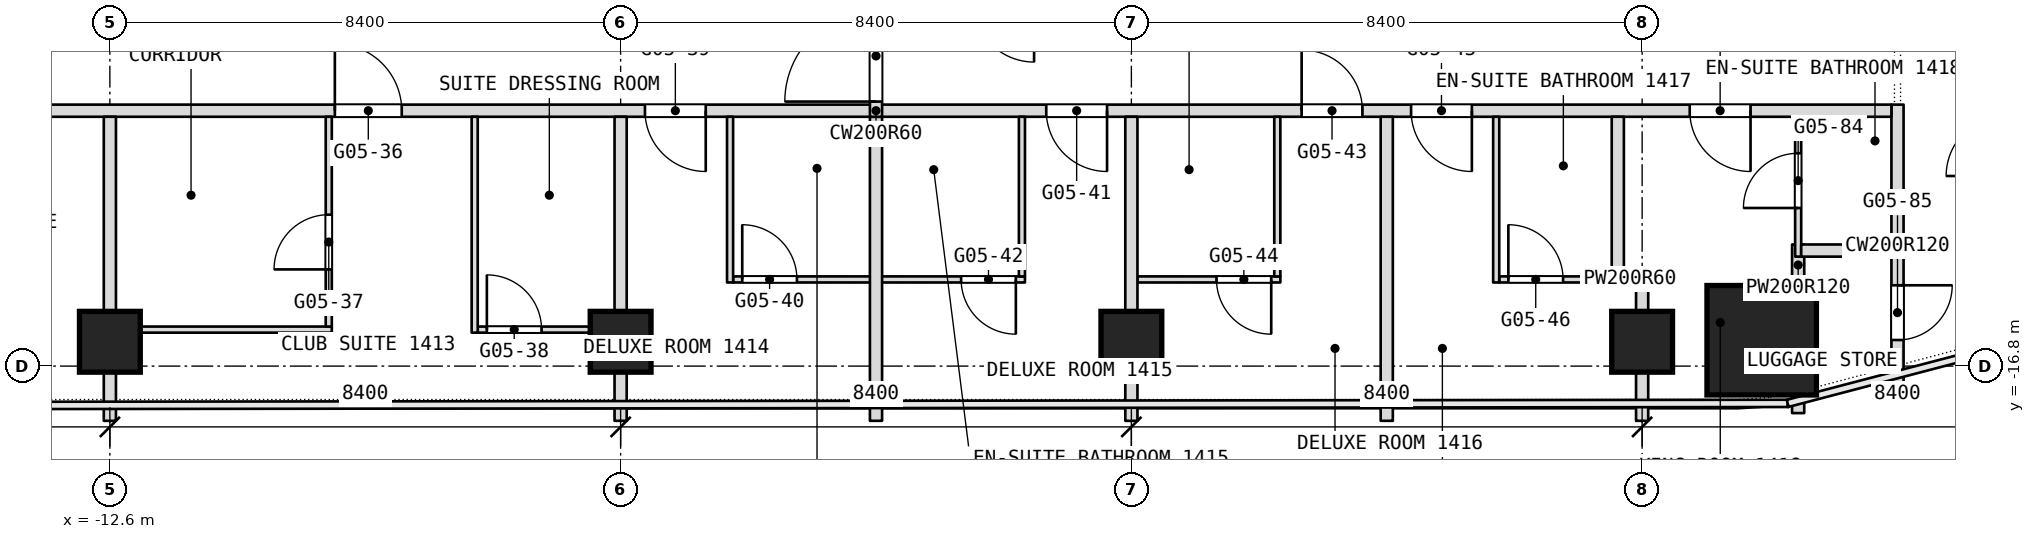
"""IFC4 building model, lengths in metres.
Left out: names, types, materials, properties, quantities, classifications, styles, units other than length and angle.
Written with IfcOpenShell. Run it as: python <this file> out.ifc"""

import sys

from ifc_helpers import new_model, si_unit, direction, frame, frame_2d, origin, origin_2d, place, context, subcontext, project, spatial, rectangle, extrude, element, fill, save


model = new_model("IFC4")
c1 = context("Model", 3, precision=1e-05, world=origin(), true_north=direction((0.0, 1.0)))
c2 = subcontext(c1, "Body", "Model", "MODEL_VIEW")
j1 = project(units=[si_unit("LENGTHUNIT", "METRE"), si_unit("PLANEANGLEUNIT", "RADIAN")], contexts=[c1])
p1 = place(None, origin())
s1 = spatial("IfcSite", under=j1, at=p1, CompositionType="ELEMENT")
p2 = place(p1, origin())
s2 = spatial("IfcBuilding", under=s1, at=p2, CompositionType="ELEMENT")
p3 = place(p2, frame((0.0, 0.0, 65.3)))
s3 = spatial("IfcBuildingStorey", under=s2, at=p3, CompositionType="ELEMENT", Elevation=65.3)
p4 = place(p3, frame((14.566, -16.375, 0.0), z_axis=(0.0, 0.0, 1.0), x_axis=(1.0, 0.0, 0.0)))
e1 = element("IfcColumn", 1, at=p4, inside=s3, PredefinedType="COLUMN", context=c2, shape_type="SweptSolid", body=[
    extrude(rectangle(XDim=1.8, YDim=1.8, at=origin_2d()), origin(), (0.0, 0.0, 1.0), 3.6),
])
for number, where, z_axis, x_axis in (
    (2, (12.6, -16.4, 0.0), (0.0, 0.0, 1.0), (1.0, 0.0, 0.0)),
    (3, (4.2, -16.4, 0.0), (0.0, 0.0, 1.0), (1.0, 0.0, 0.0)),
    (4, (-4.2, -16.4, 0.0), (0.0, 0.0, 1.0), (1.0, 0.0, 0.0)),
    (5, (-12.6, -16.4, 0.0), (0.0, 0.0, 1.0), (1.0, 0.0, 0.0)),
):
    element("IfcColumn", number, at=place(p3, frame(where, z_axis=z_axis, x_axis=x_axis)), inside=s3, PredefinedType="COLUMN", context=c2, shape_type="SweptSolid", body=[
        extrude(rectangle(XDim=1.0, YDim=1.0, at=origin_2d()), origin(), (0.0, 0.0, 1.0), 3.6),
    ])
p5 = place(p3, frame((16.8, -17.143, 0.0), z_axis=(0.0, 0.0, 1.0), x_axis=(0.0, 1.0, 0.0)))
e6 = element("IfcWall", 6, at=p5, inside=s3, PredefinedType="PARTITIONING", context=c2, shape_type="SweptSolid", body=[
    extrude(rectangle(XDim=4.643, YDim=0.2, at=frame_2d((2.322, 0.0))), origin(), (0.0, 0.0, 1.0), 3.34),
])
p6 = place(p5, frame((0.772, 0.0, 0.0)))
e7 = element("IfcOpeningElement", 7, at=p6, cuts=e6, PredefinedType="OPENING", context=c2, shape_type="SweptSolid", body=[
    extrude(rectangle(XDim=0.9, YDim=2.1, at=frame_2d((0.45, 1.05))), frame((0.0, 0.1, 0.0), z_axis=(0.0, -1.0, 0.0), x_axis=(1.0, 0.0, 0.0)), (0.0, 0.0, 1.0), 0.2),
])
p7 = place(p3, frame((-12.5, -16.2, 0.0), z_axis=(0.0, 0.0, 1.0), x_axis=(1.0, 0.0, 0.0)))
e8 = element("IfcWall", 8, at=p7, inside=s3, PredefinedType="PARTITIONING", context=c2, shape_type="SweptSolid", body=[
    extrude(rectangle(XDim=3.55, YDim=0.1, at=frame_2d((1.775, 0.0))), origin(), (0.0, 0.0, 1.0), 2.94),
])
p8 = place(p3, frame((-6.55, -16.2, 0.0), z_axis=(0.0, 0.0, 1.0), x_axis=(1.0, 0.0, 0.0)))
e9 = element("IfcWall", 9, at=p8, inside=s3, PredefinedType="PARTITIONING", context=c2, shape_type="SweptSolid", body=[
    extrude(rectangle(XDim=2.45, YDim=0.1, at=frame_2d((1.225, 0.0))), origin(), (0.0, 0.0, 1.0), 2.94),
])
p9 = place(p8, frame((0.15, 0.0, 0.0)))
e10 = element("IfcOpeningElement", 10, at=p9, cuts=e9, PredefinedType="OPENING", context=c2, shape_type="SweptSolid", body=[
    extrude(rectangle(XDim=0.9, YDim=2.1, at=frame_2d((0.45, 1.05))), frame((0.0, 0.05, 0.0), z_axis=(0.0, -1.0, 0.0), x_axis=(1.0, 0.0, 0.0)), (0.0, 0.0, 1.0), 0.1),
])
p10 = place(p3, frame((-2.35, -15.375, 0.0), z_axis=(0.0, 0.0, 1.0), x_axis=(1.0, 0.0, 0.0)))
e11 = element("IfcWall", 11, at=p10, inside=s3, PredefinedType="PARTITIONING", context=c2, shape_type="SweptSolid", body=[
    extrude(rectangle(XDim=4.8, YDim=0.1, at=frame_2d((2.4, 0.0))), origin(), (0.0, 0.0, 1.0), 3.34),
])
p11 = place(p10, frame((0.15, 0.0, 0.0)))
e12 = element("IfcOpeningElement", 12, at=p11, cuts=e11, PredefinedType="OPENING", context=c2, shape_type="SweptSolid", body=[
    extrude(rectangle(XDim=0.9, YDim=2.1, at=frame_2d((0.45, 1.05))), frame((0.0, 0.05, 0.0), z_axis=(0.0, -1.0, 0.0), x_axis=(1.0, 0.0, 0.0)), (0.0, 0.0, 1.0), 0.1),
])
p12 = place(p10, frame((3.75, 0.0, 0.0)))
e13 = element("IfcOpeningElement", 13, at=p12, cuts=e11, PredefinedType="OPENING", context=c2, shape_type="SweptSolid", body=[
    extrude(rectangle(XDim=0.9, YDim=2.1, at=frame_2d((0.45, 1.05))), frame((0.0, 0.05, 0.0), z_axis=(0.0, -1.0, 0.0), x_axis=(1.0, 0.0, 0.0)), (0.0, 0.0, 1.0), 0.1),
])
p13 = place(p3, frame((4.3, -15.375, 0.0), z_axis=(0.0, 0.0, 1.0), x_axis=(1.0, 0.0, 0.0)))
e14 = element("IfcWall", 14, at=p13, inside=s3, PredefinedType="PARTITIONING", context=c2, shape_type="SweptSolid", body=[
    extrude(rectangle(XDim=2.35, YDim=0.1, at=frame_2d((1.175, 0.0))), origin(), (0.0, 0.0, 1.0), 3.34),
])
p14 = place(p13, frame((1.3, 0.0, 0.0)))
e15 = element("IfcOpeningElement", 15, at=p14, cuts=e14, PredefinedType="OPENING", context=c2, shape_type="SweptSolid", body=[
    extrude(rectangle(XDim=0.9, YDim=2.1, at=frame_2d((0.45, 1.05))), frame((0.0, 0.05, 0.0), z_axis=(0.0, -1.0, 0.0), x_axis=(1.0, 0.0, 0.0)), (0.0, 0.0, 1.0), 0.1),
])
p15 = place(p3, frame((10.25, -15.375, 0.0), z_axis=(0.0, 0.0, 1.0), x_axis=(1.0, 0.0, 0.0)))
e16 = element("IfcWall", 16, at=p15, inside=s3, PredefinedType="PARTITIONING", context=c2, shape_type="SweptSolid", body=[
    extrude(rectangle(XDim=2.05, YDim=0.1, at=frame_2d((1.025, 0.0))), origin(), (0.0, 0.0, 1.0), 3.34),
])
p16 = place(p15, frame((0.15, 0.0, 0.0)))
e17 = element("IfcOpeningElement", 17, at=p16, cuts=e16, PredefinedType="OPENING", context=c2, shape_type="SweptSolid", body=[
    extrude(rectangle(XDim=0.9, YDim=2.1, at=frame_2d((0.45, 1.05))), frame((0.0, 0.05, 0.0), z_axis=(0.0, -1.0, 0.0), x_axis=(1.0, 0.0, 0.0)), (0.0, 0.0, 1.0), 0.1),
])
p17 = place(p3, frame((12.1, -15.375, 0.0), z_axis=(0.0, 0.0, 1.0), x_axis=(1.0, 0.0, 0.0)))
e18 = element("IfcWall", 18, at=p17, inside=s3, PredefinedType="PARTITIONING", context=c2, shape_type="SweptSolid", body=[
    extrude(rectangle(XDim=0.6, YDim=0.2, at=frame_2d((0.3, 0.0))), origin(), (0.0, 0.0, 1.0), 3.34),
])
p18 = place(p3, frame((15.166, -17.573, 0.0), z_axis=(0.0, 0.0, 1.0), x_axis=(0.0, 1.0, 0.0)))
e19 = element("IfcWall", 19, at=p18, inside=s3, PredefinedType="PARTITIONING", context=c2, shape_type="SweptSolid", body=[
    extrude(rectangle(XDim=0.298, YDim=0.2, at=frame_2d((0.149, 0.0))), origin(), (0.0, 0.0, 1.0), 3.34),
])
p19 = place(p3, frame((15.166, -15.475, 0.0), z_axis=(0.0, 0.0, 1.0), x_axis=(0.0, 1.0, 0.0)))
e20 = element("IfcWall", 20, at=p19, inside=s3, PredefinedType="PARTITIONING", context=c2, shape_type="SweptSolid", body=[
    extrude(rectangle(XDim=0.675, YDim=0.2, at=frame_2d((0.337, 0.0))), origin(), (0.0, 0.0, 1.0), 3.34),
])
p20 = place(p3, frame((15.166, -15.0, 0.0), z_axis=(0.0, 0.0, 1.0), x_axis=(0.0, 1.0, 0.0)))
e21 = element("IfcWall", 21, at=p20, inside=s3, PredefinedType="PARTITIONING", context=c2, shape_type="SweptSolid", body=[
    extrude(rectangle(XDim=2.3, YDim=0.1, at=frame_2d((1.15, 0.0))), origin(), (0.0, 0.0, 1.0), 3.34),
])
p21 = place(p20, frame((0.8, 0.0, 0.0)))
e22 = element("IfcOpeningElement", 22, at=p21, cuts=e21, PredefinedType="OPENING", context=c2, shape_type="SweptSolid", body=[
    extrude(rectangle(XDim=0.9, YDim=2.1, at=frame_2d((0.45, 1.05))), frame((0.0, 0.05, 0.0), z_axis=(0.0, -1.0, 0.0), x_axis=(1.0, 0.0, 0.0)), (0.0, 0.0, 1.0), 0.1),
])
p22 = place(p3, frame((15.216, -14.9, 0.0), z_axis=(0.0, 0.0, 1.0), x_axis=(1.0, 0.0, 0.0)))
e23 = element("IfcWall", 23, at=p22, inside=s3, PredefinedType="PARTITIONING", context=c2, shape_type="SweptSolid", body=[
    extrude(rectangle(XDim=1.484, YDim=0.2, at=frame_2d((0.742, 0.0))), origin(), (0.0, 0.0, 1.0), 3.34),
])
p23 = place(p3, frame((12.6, -17.7, 0.0), z_axis=(0.0, 0.0, 1.0), x_axis=(0.0, 1.0, 0.0)))
e24 = element("IfcWall", 24, at=p23, inside=s3, PredefinedType="PARTITIONING", context=c2, shape_type="SweptSolid", body=[
    extrude(rectangle(XDim=2.225, YDim=0.2, at=frame_2d((1.112, 0.0))), origin(), (0.0, 0.0, 1.0), 3.34),
])
p24 = place(p3, frame((-16.7, -12.6, 0.0), z_axis=(0.0, 0.0, 1.0), x_axis=(1.0, 0.0, 0.0)))
e25 = element("IfcWall", 25, at=p24, inside=s3, PredefinedType="PARTITIONING", context=c2, shape_type="SweptSolid", body=[
    extrude(rectangle(XDim=33.4, YDim=0.2, at=frame_2d((16.7, 0.0))), origin(), (0.0, 0.0, 1.0), 3.34),
])
p25 = place(p24, frame((1.5, 0.0, 0.0)))
e26 = element("IfcOpeningElement", 26, at=p25, cuts=e25, PredefinedType="OPENING", context=c2, shape_type="SweptSolid", body=[
    extrude(rectangle(XDim=1.0, YDim=2.1, at=frame_2d((0.5, 1.05))), frame((0.0, 0.1, 0.0), z_axis=(0.0, -1.0, 0.0), x_axis=(1.0, 0.0, 0.0)), (0.0, 0.0, 1.0), 0.2),
])
p26 = place(p24, frame((7.8, 0.0, 0.0)))
e27 = element("IfcOpeningElement", 27, at=p26, cuts=e25, PredefinedType="OPENING", context=c2, shape_type="SweptSolid", body=[
    extrude(rectangle(XDim=1.1, YDim=2.1, at=frame_2d((0.55, 1.05))), frame((0.0, 0.1, 0.0), z_axis=(0.0, -1.0, 0.0), x_axis=(1.0, 0.0, 0.0)), (0.0, 0.0, 1.0), 0.2),
])
p27 = place(p24, frame((12.9, 0.0, 0.0)))
e28 = element("IfcOpeningElement", 28, at=p27, cuts=e25, PredefinedType="OPENING", context=c2, shape_type="SweptSolid", body=[
    extrude(rectangle(XDim=1.0, YDim=2.1, at=frame_2d((0.5, 1.05))), frame((0.0, 0.1, 0.0), z_axis=(0.0, -1.0, 0.0), x_axis=(1.0, 0.0, 0.0)), (0.0, 0.0, 1.0), 0.2),
])
p28 = place(p24, frame((19.5, 0.0, 0.0)))
e29 = element("IfcOpeningElement", 29, at=p28, cuts=e25, PredefinedType="OPENING", context=c2, shape_type="SweptSolid", body=[
    extrude(rectangle(XDim=1.0, YDim=2.1, at=frame_2d((0.5, 1.05))), frame((0.0, 0.1, 0.0), z_axis=(0.0, -1.0, 0.0), x_axis=(1.0, 0.0, 0.0)), (0.0, 0.0, 1.0), 0.2),
])
p29 = place(p24, frame((23.7, 0.0, 0.0)))
e30 = element("IfcOpeningElement", 30, at=p29, cuts=e25, PredefinedType="OPENING", context=c2, shape_type="SweptSolid", body=[
    extrude(rectangle(XDim=1.0, YDim=2.1, at=frame_2d((0.5, 1.05))), frame((0.0, 0.1, 0.0), z_axis=(0.0, -1.0, 0.0), x_axis=(1.0, 0.0, 0.0)), (0.0, 0.0, 1.0), 0.2),
])
p30 = place(p24, frame((25.5, 0.0, 0.0)))
e31 = element("IfcOpeningElement", 31, at=p30, cuts=e25, PredefinedType="OPENING", context=c2, shape_type="SweptSolid", body=[
    extrude(rectangle(XDim=1.0, YDim=2.1, at=frame_2d((0.5, 1.05))), frame((0.0, 0.1, 0.0), z_axis=(0.0, -1.0, 0.0), x_axis=(1.0, 0.0, 0.0)), (0.0, 0.0, 1.0), 0.2),
])
p31 = place(p24, frame((30.083, 0.0, 0.0)))
e32 = element("IfcOpeningElement", 32, at=p31, cuts=e25, PredefinedType="OPENING", context=c2, shape_type="SweptSolid", body=[
    extrude(rectangle(XDim=1.0, YDim=2.1, at=frame_2d((0.5, 1.05))), frame((0.0, 0.1, 0.0), z_axis=(0.0, -1.0, 0.0), x_axis=(1.0, 0.0, 0.0)), (0.0, 0.0, 1.0), 0.2),
])
p32 = place(p3, frame((12.2, -15.325, 0.0), z_axis=(0.0, 0.0, 1.0), x_axis=(0.0, 1.0, 0.0)))
e33 = element("IfcWall", 33, at=p32, inside=s3, PredefinedType="PARTITIONING", context=c2, shape_type="SweptSolid", body=[
    extrude(rectangle(XDim=2.625, YDim=0.2, at=frame_2d((1.312, 0.0))), origin(), (0.0, 0.0, 1.0), 3.34),
])
p33 = place(p3, frame((10.2, -15.425, 0.0), z_axis=(0.0, 0.0, 1.0), x_axis=(0.0, 1.0, 0.0)))
e34 = element("IfcWall", 34, at=p33, inside=s3, PredefinedType="PARTITIONING", context=c2, shape_type="SweptSolid", body=[
    extrude(rectangle(XDim=2.725, YDim=0.1, at=frame_2d((1.363, 0.0))), origin(), (0.0, 0.0, 1.0), 3.34),
])
p34 = place(p3, frame((8.4, -17.7, 0.0), z_axis=(0.0, 0.0, 1.0), x_axis=(0.0, 1.0, 0.0)))
e35 = element("IfcWall", 35, at=p34, inside=s3, PredefinedType="PARTITIONING", context=c2, shape_type="SweptSolid", body=[
    extrude(rectangle(XDim=5.0, YDim=0.2, at=frame_2d((2.5, 0.0))), origin(), (0.0, 0.0, 1.0), 3.34),
])
p35 = place(p3, frame((6.6, -15.325, 0.0), z_axis=(0.0, 0.0, 1.0), x_axis=(0.0, 1.0, 0.0)))
e36 = element("IfcWall", 36, at=p35, inside=s3, PredefinedType="PARTITIONING", context=c2, shape_type="SweptSolid", body=[
    extrude(rectangle(XDim=2.625, YDim=0.1, at=frame_2d((1.312, 0.0))), origin(), (0.0, 0.0, 1.0), 3.34),
])
p36 = place(p3, frame((4.2, -17.7, 0.0), z_axis=(0.0, 0.0, 1.0), x_axis=(0.0, 1.0, 0.0)))
e37 = element("IfcWall", 37, at=p36, inside=s3, PredefinedType="PARTITIONING", context=c2, shape_type="SweptSolid", body=[
    extrude(rectangle(XDim=5.0, YDim=0.2, at=frame_2d((2.5, 0.0))), origin(), (0.0, 0.0, 1.0), 3.34),
])
p37 = place(p3, frame((2.4, -15.325, 0.0), z_axis=(0.0, 0.0, 1.0), x_axis=(0.0, 1.0, 0.0)))
e38 = element("IfcWall", 38, at=p37, inside=s3, PredefinedType="PARTITIONING", context=c2, shape_type="SweptSolid", body=[
    extrude(rectangle(XDim=2.625, YDim=0.1, at=frame_2d((1.312, 0.0))), origin(), (0.0, 0.0, 1.0), 3.34),
])
p38 = place(p3, frame((0.0, -17.7, 0.0), z_axis=(0.0, 0.0, 1.0), x_axis=(0.0, 1.0, 0.0)))
e39 = element("IfcWall", 39, at=p38, inside=s3, PredefinedType="PARTITIONING", context=c2, shape_type="SweptSolid", body=[
    extrude(rectangle(XDim=5.0, YDim=0.2, at=frame_2d((2.5, 0.0))), origin(), (0.0, 0.0, 1.0), 3.34),
])
p39 = place(p3, frame((0.0, -12.7, 0.0), z_axis=(0.0, 0.0, 1.0), x_axis=(0.0, 1.0, 0.0)))
e40 = element("IfcWall", 40, at=p39, inside=s3, PredefinedType="PARTITIONING", context=c2, shape_type="SweptSolid", body=[
    extrude(rectangle(XDim=12.7, YDim=0.2, at=frame_2d((6.35, 0.0))), origin(), (0.0, 0.0, 1.0), 3.34),
])
p40 = place(p39, frame((11.05, 0.0, 0.0)))
e41 = element("IfcOpeningElement", 41, at=p40, cuts=e40, PredefinedType="OPENING", context=c2, shape_type="SweptSolid", body=[
    extrude(rectangle(XDim=1.5, YDim=2.1, at=frame_2d((0.75, 1.05))), frame((0.0, 0.1, 0.0), z_axis=(0.0, -1.0, 0.0), x_axis=(1.0, 0.0, 0.0)), (0.0, 0.0, 1.0), 0.2),
])
p41 = place(p39, frame((0.25, 0.0, 0.0)))
e42 = element("IfcOpeningElement", 42, at=p41, cuts=e40, PredefinedType="OPENING", context=c2, shape_type="SweptSolid", body=[
    extrude(rectangle(XDim=1.5, YDim=2.1, at=frame_2d((0.75, 1.05))), frame((0.0, 0.1, 0.0), z_axis=(0.0, -1.0, 0.0), x_axis=(1.0, 0.0, 0.0)), (0.0, 0.0, 1.0), 0.2),
])
p42 = place(p3, frame((-2.4, -15.425, 0.0), z_axis=(0.0, 0.0, 1.0), x_axis=(0.0, 1.0, 0.0)))
e43 = element("IfcWall", 43, at=p42, inside=s3, PredefinedType="PARTITIONING", context=c2, shape_type="SweptSolid", body=[
    extrude(rectangle(XDim=2.725, YDim=0.1, at=frame_2d((1.363, 0.0))), origin(), (0.0, 0.0, 1.0), 3.34),
])
p43 = place(p3, frame((-4.2, -17.7, 0.0), z_axis=(0.0, 0.0, 1.0), x_axis=(0.0, 1.0, 0.0)))
e44 = element("IfcWall", 44, at=p43, inside=s3, PredefinedType="PARTITIONING", context=c2, shape_type="SweptSolid", body=[
    extrude(rectangle(XDim=5.0, YDim=0.2, at=frame_2d((2.5, 0.0))), origin(), (0.0, 0.0, 1.0), 3.34),
])
p44 = place(p3, frame((-6.6, -16.25, 0.0), z_axis=(0.0, 0.0, 1.0), x_axis=(0.0, 1.0, 0.0)))
e45 = element("IfcWall", 45, at=p44, inside=s3, PredefinedType="PARTITIONING", context=c2, shape_type="SweptSolid", body=[
    extrude(rectangle(XDim=3.55, YDim=0.1, at=frame_2d((1.775, 0.0))), origin(), (0.0, 0.0, 1.0), 3.34),
])
p45 = place(p3, frame((-9.0, -16.15, 0.0), z_axis=(0.0, 0.0, 1.0), x_axis=(0.0, 1.0, 0.0)))
e46 = element("IfcWall", 46, at=p45, inside=s3, PredefinedType="PARTITIONING", context=c2, shape_type="SweptSolid", body=[
    extrude(rectangle(XDim=3.45, YDim=0.1, at=frame_2d((1.725, 0.0))), origin(), (0.0, 0.0, 1.0), 3.34),
])
p46 = place(p45, frame((0.94, 0.0, 0.0)))
e47 = element("IfcOpeningElement", 47, at=p46, cuts=e46, PredefinedType="OPENING", context=c2, shape_type="SweptSolid", body=[
    extrude(rectangle(XDim=0.9, YDim=2.1, at=frame_2d((0.45, 1.05))), frame((0.0, 0.05, 0.0), z_axis=(0.0, -1.0, 0.0), x_axis=(1.0, 0.0, 0.0)), (0.0, 0.0, 1.0), 0.1),
])
p47 = place(p3, frame((-12.6, -17.7, 0.0), z_axis=(0.0, 0.0, 1.0), x_axis=(0.0, 1.0, 0.0)))
e48 = element("IfcWall", 48, at=p47, inside=s3, PredefinedType="PARTITIONING", context=c2, shape_type="SweptSolid", body=[
    extrude(rectangle(XDim=5.0, YDim=0.2, at=frame_2d((2.5, 0.0))), origin(), (0.0, 0.0, 1.0), 3.34),
])
p48 = place(p6, origin())
e49 = element("IfcDoor", 49, at=p48, inside=s3, OperationType="SINGLE_SWING_RIGHT", PredefinedType="DOOR", context=c2, shape_type="SweptSolid", body=[
    extrude(rectangle(XDim=0.9, YDim=2.1, at=frame_2d((0.45, 1.05))), frame((0.0, 0.025, 0.0), z_axis=(0.0, -1.0, 0.0), x_axis=(1.0, 0.0, 0.0)), (0.0, 0.0, 1.0), 0.05),
])
fill(e7, e49)
p49 = place(p9, origin())
e50 = element("IfcDoor", 50, at=p49, inside=s3, OperationType="SINGLE_SWING_LEFT", PredefinedType="DOOR", context=c2, shape_type="SweptSolid", body=[
    extrude(rectangle(XDim=0.9, YDim=2.1, at=frame_2d((0.45, 1.05))), frame((0.0, 0.025, 0.0), z_axis=(0.0, -1.0, 0.0), x_axis=(1.0, 0.0, 0.0)), (0.0, 0.0, 1.0), 0.05),
])
fill(e10, e50)
p50 = place(p11, origin())
e51 = element("IfcDoor", 51, at=p50, inside=s3, OperationType="SINGLE_SWING_LEFT", PredefinedType="DOOR", context=c2, shape_type="SweptSolid", body=[
    extrude(rectangle(XDim=0.9, YDim=2.1, at=frame_2d((0.45, 1.05))), frame((0.0, 0.025, 0.0), z_axis=(0.0, -1.0, 0.0), x_axis=(1.0, 0.0, 0.0)), (0.0, 0.0, 1.0), 0.05),
])
fill(e12, e51)
p51 = place(p12, origin())
e52 = element("IfcDoor", 52, at=p51, inside=s3, OperationType="SINGLE_SWING_RIGHT", PredefinedType="DOOR", context=c2, shape_type="SweptSolid", body=[
    extrude(rectangle(XDim=0.9, YDim=2.1, at=frame_2d((0.45, 1.05))), frame((0.0, 0.025, 0.0), z_axis=(0.0, -1.0, 0.0), x_axis=(1.0, 0.0, 0.0)), (0.0, 0.0, 1.0), 0.05),
])
fill(e13, e52)
p52 = place(p14, origin())
e53 = element("IfcDoor", 53, at=p52, inside=s3, OperationType="SINGLE_SWING_RIGHT", PredefinedType="DOOR", context=c2, shape_type="SweptSolid", body=[
    extrude(rectangle(XDim=0.9, YDim=2.1, at=frame_2d((0.45, 1.05))), frame((0.0, 0.025, 0.0), z_axis=(0.0, -1.0, 0.0), x_axis=(1.0, 0.0, 0.0)), (0.0, 0.0, 1.0), 0.05),
])
fill(e15, e53)
p53 = place(p16, origin())
e54 = element("IfcDoor", 54, at=p53, inside=s3, OperationType="SINGLE_SWING_LEFT", PredefinedType="DOOR", context=c2, shape_type="SweptSolid", body=[
    extrude(rectangle(XDim=0.9, YDim=2.1, at=frame_2d((0.45, 1.05))), frame((0.0, 0.025, 0.0), z_axis=(0.0, -1.0, 0.0), x_axis=(1.0, 0.0, 0.0)), (0.0, 0.0, 1.0), 0.05),
])
fill(e17, e54)
p54 = place(p21, origin())
e55 = element("IfcDoor", 55, at=p54, inside=s3, OperationType="SINGLE_SWING_RIGHT", PredefinedType="DOOR", context=c2, shape_type="SweptSolid", body=[
    extrude(rectangle(XDim=0.9, YDim=2.1, at=frame_2d((0.45, 1.05))), frame((0.0, 0.025, 0.0), z_axis=(0.0, -1.0, 0.0), x_axis=(1.0, 0.0, 0.0)), (0.0, 0.0, 1.0), 0.05),
])
fill(e22, e55)
p55 = place(p26, origin())
e56 = element("IfcDoor", 56, at=p55, inside=s3, OperationType="SINGLE_SWING_RIGHT", PredefinedType="DOOR", context=c2, shape_type="SweptSolid", body=[
    extrude(rectangle(XDim=1.1, YDim=2.1, at=frame_2d((0.55, 1.05))), frame((0.0, 0.025, 0.0), z_axis=(0.0, -1.0, 0.0), x_axis=(1.0, 0.0, 0.0)), (0.0, 0.0, 1.0), 0.05),
])
fill(e27, e56)
p56 = place(p27, origin())
e57 = element("IfcDoor", 57, at=p56, inside=s3, OperationType="SINGLE_SWING_LEFT", PredefinedType="DOOR", context=c2, shape_type="SweptSolid", body=[
    extrude(rectangle(XDim=1.0, YDim=2.1, at=frame_2d((0.5, 1.05))), frame((0.0, 0.025, 0.0), z_axis=(0.0, -1.0, 0.0), x_axis=(1.0, 0.0, 0.0)), (0.0, 0.0, 1.0), 0.05),
])
fill(e28, e57)
p57 = place(p28, origin())
e58 = element("IfcDoor", 58, at=p57, inside=s3, OperationType="SINGLE_SWING_LEFT", PredefinedType="DOOR", context=c2, shape_type="SweptSolid", body=[
    extrude(rectangle(XDim=1.0, YDim=2.1, at=frame_2d((0.5, 1.05))), frame((0.0, 0.025, 0.0), z_axis=(0.0, -1.0, 0.0), x_axis=(1.0, 0.0, 0.0)), (0.0, 0.0, 1.0), 0.05),
])
fill(e29, e58)
p58 = place(p29, origin())
e59 = element("IfcDoor", 59, at=p58, inside=s3, OperationType="SINGLE_SWING_LEFT", PredefinedType="DOOR", context=c2, shape_type="SweptSolid", body=[
    extrude(rectangle(XDim=1.0, YDim=2.1, at=frame_2d((0.5, 1.05))), frame((0.0, 0.025, 0.0), z_axis=(0.0, -1.0, 0.0), x_axis=(1.0, 0.0, 0.0)), (0.0, 0.0, 1.0), 0.05),
])
fill(e30, e59)
p59 = place(p30, origin())
e60 = element("IfcDoor", 60, at=p59, inside=s3, OperationType="SINGLE_SWING_LEFT", PredefinedType="DOOR", context=c2, shape_type="SweptSolid", body=[
    extrude(rectangle(XDim=1.0, YDim=2.1, at=frame_2d((0.5, 1.05))), frame((0.0, 0.025, 0.0), z_axis=(0.0, -1.0, 0.0), x_axis=(1.0, 0.0, 0.0)), (0.0, 0.0, 1.0), 0.05),
])
fill(e31, e60)
p60 = place(p31, origin())
e61 = element("IfcDoor", 61, at=p60, inside=s3, OperationType="SINGLE_SWING_LEFT", PredefinedType="DOOR", context=c2, shape_type="SweptSolid", body=[
    extrude(rectangle(XDim=1.0, YDim=2.1, at=frame_2d((0.5, 1.05))), frame((0.0, 0.025, 0.0), z_axis=(0.0, -1.0, 0.0), x_axis=(1.0, 0.0, 0.0)), (0.0, 0.0, 1.0), 0.05),
])
fill(e32, e61)
p61 = place(p46, origin())
e62 = element("IfcDoor", 62, at=p61, inside=s3, OperationType="SINGLE_SWING_LEFT", PredefinedType="DOOR", context=c2, shape_type="SweptSolid", body=[
    extrude(rectangle(XDim=0.9, YDim=2.1, at=frame_2d((0.45, 1.05))), frame((0.0, 0.025, 0.0), z_axis=(0.0, -1.0, 0.0), x_axis=(1.0, 0.0, 0.0)), (0.0, 0.0, 1.0), 0.05),
])
fill(e47, e62)
p62 = place(p41, origin())
e63 = element("IfcDoor", 63, at=p62, inside=s3, OperationType="DOUBLE_DOOR_DOUBLE_SWING", PredefinedType="DOOR", context=c2, shape_type="SweptSolid", body=[
    extrude(rectangle(XDim=1.5, YDim=2.1, at=frame_2d((0.75, 1.05))), frame((0.0, 0.025, 0.0), z_axis=(0.0, -1.0, 0.0), x_axis=(1.0, 0.0, 0.0)), (0.0, 0.0, 1.0), 0.05),
])
fill(e42, e63)
save(model, sys.argv[1])
